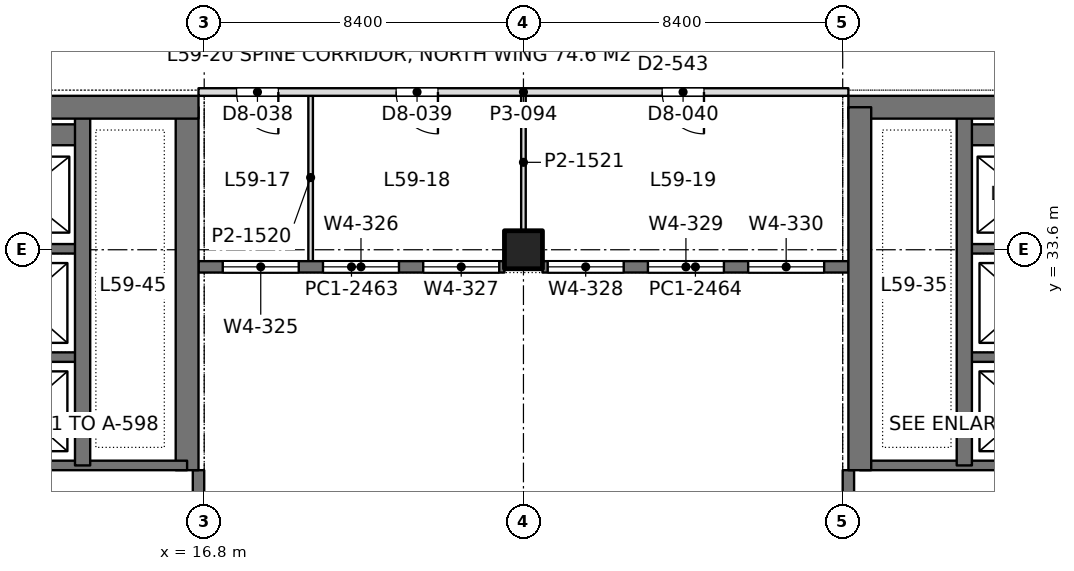
"""IFC4 building model, lengths in metres.
Left out: names, types, materials, properties, quantities, classifications, styles, units other than length and angle.
Written with IfcOpenShell. Run it as: python <this file> out.ifc"""

import sys

from ifc_helpers import new_model, si_unit, direction, frame, frame_2d, origin, origin_2d, place, context, subcontext, project, spatial, rectangle, extrude, element, fill, save


model = new_model("IFC4")
c1 = context("Model", 3, precision=1e-05, world=origin(), true_north=direction((0.0, 1.0)))
c2 = subcontext(c1, "Body", "Model", "MODEL_VIEW")
j1 = project(units=[si_unit("LENGTHUNIT", "METRE"), si_unit("PLANEANGLEUNIT", "RADIAN")], contexts=[c1])
p1 = place(None, origin())
s1 = spatial("IfcSite", under=j1, at=p1, CompositionType="ELEMENT")
p2 = place(p1, origin())
s2 = spatial("IfcBuilding", under=s1, at=p2, CompositionType="ELEMENT")
p3 = place(p2, frame((0.0, 0.0, 259.2)))
s3 = spatial("IfcBuildingStorey", under=s2, at=p3, CompositionType="ELEMENT", Elevation=259.2)
p4 = place(p3, frame((25.2, 33.6, 0.0), z_axis=(0.0, 0.0, 1.0), x_axis=(1.0, 0.0, 0.0)))
e1 = element("IfcColumn", 1, at=p4, inside=s3, PredefinedType="COLUMN", context=c2, shape_type="SweptSolid", body=[
    extrude(rectangle(XDim=1.0, YDim=1.0, at=origin_2d()), origin(), (0.0, 0.0, 1.0), 4.5),
])
p5 = place(p3, frame((-1.05, 37.35, 0.0), z_axis=(0.0, 0.0, 1.0), x_axis=(1.0, 0.0, 0.0)))
e2 = element("IfcWall", 2, at=p5, inside=s3, PredefinedType="SHEAR", context=c2, shape_type="SweptSolid", body=[
    extrude(rectangle(XDim=17.7, YDim=0.6, at=frame_2d((8.85, 0.0))), origin(), (0.0, 0.0, 1.0), 4.5),
])
p6 = place(p5, frame((8.8, 0.0, 0.0)))
e3 = element("IfcOpeningElement", 3, at=p6, cuts=e2, PredefinedType="OPENING", context=c2, shape_type="SweptSolid", body=[
    extrude(rectangle(XDim=1.8, YDim=2.4, at=frame_2d((0.9, 1.2))), frame((0.0, 0.31, 0.0), z_axis=(0.0, -1.0, 0.0), x_axis=(1.0, 0.0, 0.0)), (0.0, 0.0, 1.0), 0.62),
])
p7 = place(p3, frame((16.35, 27.8, 0.0), z_axis=(0.0, 0.0, 1.0), x_axis=(0.0, 1.0, 0.0)))
e4 = element("IfcWall", 4, at=p7, inside=s3, PredefinedType="SHEAR", context=c2, shape_type="SweptSolid", body=[
    extrude(rectangle(XDim=9.55, YDim=0.6, at=frame_2d((4.775, 0.0))), origin(), (0.0, 0.0, 1.0), 4.5),
])
p8 = place(p3, frame((13.6, 27.925, 0.0), z_axis=(0.0, 0.0, 1.0), x_axis=(0.0, 1.0, 0.0)))
e5 = element("IfcWall", 5, at=p8, inside=s3, PredefinedType="SHEAR", context=c2, shape_type="SweptSolid", body=[
    extrude(rectangle(XDim=9.425, YDim=0.4, at=frame_2d((4.712, 0.0))), origin(), (0.0, 0.0, 1.0), 4.5),
])
p9 = place(p3, frame((10.4, 27.925, 0.0), z_axis=(0.0, 0.0, 1.0), x_axis=(1.0, 0.0, 0.0)))
e6 = element("IfcWall", 6, at=p9, inside=s3, PredefinedType="SHEAR", context=c2, shape_type="SweptSolid", body=[
    extrude(rectangle(XDim=5.95, YDim=0.25, at=frame_2d((2.975, 0.0))), origin(), (0.0, 0.0, 1.0), 4.5),
])
for number, where, z_axis, x_axis in (
    (7, (10.4, 30.775, 0.0), (0.0, 0.0, 1.0), (1.0, 0.0, 0.0)),
    (8, (10.4, 33.625, 0.0), (0.0, 0.0, 1.0), (1.0, 0.0, 0.0)),
):
    element("IfcWall", number, at=place(p3, frame(where, z_axis=z_axis, x_axis=x_axis)), inside=s3, PredefinedType="SHEAR", context=c2, shape_type="SweptSolid", body=[
        extrude(rectangle(XDim=3.2, YDim=0.25, at=frame_2d((1.6, 0.0))), origin(), (0.0, 0.0, 1.0), 4.5),
    ])
p10 = place(p3, frame((10.4, 36.625, 0.0), z_axis=(0.0, 0.0, 1.0), x_axis=(1.0, 0.0, 0.0)))
e9 = element("IfcWall", 9, at=p10, inside=s3, PredefinedType="SHEAR", context=c2, shape_type="SweptSolid", body=[
    extrude(rectangle(XDim=3.2, YDim=0.55, at=frame_2d((1.6, 0.0))), origin(), (0.0, 0.0, 1.0), 4.5),
])
p11 = place(p3, frame((33.75, 37.35, 0.0), z_axis=(0.0, 0.0, 1.0), x_axis=(1.0, 0.0, 0.0)))
e10 = element("IfcWall", 10, at=p11, inside=s3, PredefinedType="SHEAR", context=c2, shape_type="SweptSolid", body=[
    extrude(rectangle(XDim=17.7, YDim=0.6, at=frame_2d((8.85, 0.0))), origin(), (0.0, 0.0, 1.0), 4.5),
])
p12 = place(p11, frame((7.1, 0.0, 0.0)))
e11 = element("IfcOpeningElement", 11, at=p12, cuts=e10, PredefinedType="OPENING", context=c2, shape_type="SweptSolid", body=[
    extrude(rectangle(XDim=1.8, YDim=2.4, at=frame_2d((0.9, 1.2))), frame((0.0, 0.31, 0.0), z_axis=(0.0, -1.0, 0.0), x_axis=(1.0, 0.0, 0.0)), (0.0, 0.0, 1.0), 0.62),
])
p13 = place(p3, frame((34.05, 27.8, 0.0), z_axis=(0.0, 0.0, 1.0), x_axis=(0.0, 1.0, 0.0)))
e12 = element("IfcWall", 12, at=p13, inside=s3, PredefinedType="SHEAR", context=c2, shape_type="SweptSolid", body=[
    extrude(rectangle(XDim=9.55, YDim=0.6, at=frame_2d((4.775, 0.0))), origin(), (0.0, 0.0, 1.0), 4.5),
])
p14 = place(p3, frame((36.8, 27.925, 0.0), z_axis=(0.0, 0.0, 1.0), x_axis=(0.0, 1.0, 0.0)))
e13 = element("IfcWall", 13, at=p14, inside=s3, PredefinedType="SHEAR", context=c2, shape_type="SweptSolid", body=[
    extrude(rectangle(XDim=9.425, YDim=0.4, at=frame_2d((4.712, 0.0))), origin(), (0.0, 0.0, 1.0), 4.5),
])
p15 = place(p3, frame((40.0, 27.925, 0.0), z_axis=(0.0, 0.0, 1.0), x_axis=(-1.0, 0.0, 0.0)))
e14 = element("IfcWall", 14, at=p15, inside=s3, PredefinedType="SHEAR", context=c2, shape_type="SweptSolid", body=[
    extrude(rectangle(XDim=5.95, YDim=0.25, at=frame_2d((2.975, 0.0))), origin(), (0.0, 0.0, 1.0), 4.5),
])
for number, where, z_axis, x_axis in (
    (15, (40.0, 30.775, 0.0), (0.0, 0.0, 1.0), (-1.0, 0.0, 0.0)),
    (16, (40.0, 33.625, 0.0), (0.0, 0.0, 1.0), (-1.0, 0.0, 0.0)),
):
    element("IfcWall", number, at=place(p3, frame(where, z_axis=z_axis, x_axis=x_axis)), inside=s3, PredefinedType="SHEAR", context=c2, shape_type="SweptSolid", body=[
        extrude(rectangle(XDim=3.2, YDim=0.25, at=frame_2d((1.6, 0.0))), origin(), (0.0, 0.0, 1.0), 4.5),
    ])
p16 = place(p3, frame((40.0, 36.625, 0.0), z_axis=(0.0, 0.0, 1.0), x_axis=(-1.0, 0.0, 0.0)))
e17 = element("IfcWall", 17, at=p16, inside=s3, PredefinedType="SHEAR", context=c2, shape_type="SweptSolid", body=[
    extrude(rectangle(XDim=3.2, YDim=0.55, at=frame_2d((1.6, 0.0))), origin(), (0.0, 0.0, 1.0), 4.5),
])
p17 = place(p3, frame((16.65, 17.1, 0.0), z_axis=(0.0, 0.0, 1.0), x_axis=(0.0, 1.0, 0.0)))
e18 = element("IfcWall", 18, at=p17, inside=s3, PredefinedType="SOLIDWALL", context=c2, shape_type="SweptSolid", body=[
    extrude(rectangle(XDim=10.7, YDim=0.3, at=frame_2d((5.35, 0.0))), origin(), (0.0, 0.0, 1.0), 4.35),
])
p18 = place(p17, frame((0.55, 0.0, 0.9)))
e19 = element("IfcOpeningElement", 19, at=p18, cuts=e18, PredefinedType="OPENING", context=c2, shape_type="SweptSolid", body=[
    extrude(rectangle(XDim=2.0, YDim=1.9, at=frame_2d((1.0, 0.95))), frame((0.0, 0.16, 0.0), z_axis=(0.0, -1.0, 0.0), x_axis=(1.0, 0.0, 0.0)), (0.0, 0.0, 1.0), 0.32),
])
p19 = place(p17, frame((2.9, 0.0, 0.9)))
e20 = element("IfcOpeningElement", 20, at=p19, cuts=e18, PredefinedType="OPENING", context=c2, shape_type="SweptSolid", body=[
    extrude(rectangle(XDim=2.0, YDim=1.9, at=frame_2d((1.0, 0.95))), frame((0.0, 0.16, 0.0), z_axis=(0.0, -1.0, 0.0), x_axis=(1.0, 0.0, 0.0)), (0.0, 0.0, 1.0), 0.32),
])
p20 = place(p17, frame((7.675, 0.0, 0.9)))
e21 = element("IfcOpeningElement", 21, at=p20, cuts=e18, PredefinedType="OPENING", context=c2, shape_type="SweptSolid", body=[
    extrude(rectangle(XDim=2.0, YDim=1.9, at=frame_2d((1.0, 0.95))), frame((0.0, 0.16, 0.0), z_axis=(0.0, -1.0, 0.0), x_axis=(1.0, 0.0, 0.0)), (0.0, 0.0, 1.0), 0.32),
])
p21 = place(p3, frame((33.75, 17.1, 0.0), z_axis=(0.0, 0.0, 1.0), x_axis=(0.0, 1.0, 0.0)))
e22 = element("IfcWall", 22, at=p21, inside=s3, PredefinedType="SOLIDWALL", context=c2, shape_type="SweptSolid", body=[
    extrude(rectangle(XDim=10.7, YDim=0.3, at=frame_2d((5.35, 0.0))), origin(), (0.0, 0.0, 1.0), 4.35),
])
p22 = place(p21, frame((0.55, 0.0, 0.9)))
e23 = element("IfcOpeningElement", 23, at=p22, cuts=e22, PredefinedType="OPENING", context=c2, shape_type="SweptSolid", body=[
    extrude(rectangle(XDim=2.0, YDim=1.9, at=frame_2d((1.0, 0.95))), frame((0.0, 0.16, 0.0), z_axis=(0.0, -1.0, 0.0), x_axis=(1.0, 0.0, 0.0)), (0.0, 0.0, 1.0), 0.32),
])
p23 = place(p21, frame((2.9, 0.0, 0.9)))
e24 = element("IfcOpeningElement", 24, at=p23, cuts=e22, PredefinedType="OPENING", context=c2, shape_type="SweptSolid", body=[
    extrude(rectangle(XDim=2.0, YDim=1.9, at=frame_2d((1.0, 0.95))), frame((0.0, 0.16, 0.0), z_axis=(0.0, -1.0, 0.0), x_axis=(1.0, 0.0, 0.0)), (0.0, 0.0, 1.0), 0.32),
])
p24 = place(p21, frame((7.675, 0.0, 0.9)))
e25 = element("IfcOpeningElement", 25, at=p24, cuts=e22, PredefinedType="OPENING", context=c2, shape_type="SweptSolid", body=[
    extrude(rectangle(XDim=2.0, YDim=1.9, at=frame_2d((1.0, 0.95))), frame((0.0, 0.16, 0.0), z_axis=(0.0, -1.0, 0.0), x_axis=(1.0, 0.0, 0.0)), (0.0, 0.0, 1.0), 0.32),
])
p25 = place(p3, frame((16.65, 33.15, 0.0), z_axis=(0.0, 0.0, 1.0), x_axis=(1.0, 0.0, 0.0)))
e26 = element("IfcWall", 26, at=p25, inside=s3, PredefinedType="SOLIDWALL", context=c2, shape_type="SweptSolid", body=[
    extrude(rectangle(XDim=8.05, YDim=0.3, at=frame_2d((4.025, 0.0))), origin(), (0.0, 0.0, 1.0), 4.35),
])
p26 = place(p25, frame((0.637, 0.0, 0.9)))
e27 = element("IfcOpeningElement", 27, at=p26, cuts=e26, PredefinedType="OPENING", context=c2, shape_type="SweptSolid", body=[
    extrude(rectangle(XDim=2.0, YDim=1.9, at=frame_2d((1.0, 0.95))), frame((0.0, 0.16, 0.0), z_axis=(0.0, -1.0, 0.0), x_axis=(1.0, 0.0, 0.0)), (0.0, 0.0, 1.0), 0.32),
])
p27 = place(p25, frame((3.275, 0.0, 0.9)))
e28 = element("IfcOpeningElement", 28, at=p27, cuts=e26, PredefinedType="OPENING", context=c2, shape_type="SweptSolid", body=[
    extrude(rectangle(XDim=2.0, YDim=1.9, at=frame_2d((1.0, 0.95))), frame((0.0, 0.16, 0.0), z_axis=(0.0, -1.0, 0.0), x_axis=(1.0, 0.0, 0.0)), (0.0, 0.0, 1.0), 0.32),
])
p28 = place(p25, frame((5.913, 0.0, 0.9)))
e29 = element("IfcOpeningElement", 29, at=p28, cuts=e26, PredefinedType="OPENING", context=c2, shape_type="SweptSolid", body=[
    extrude(rectangle(XDim=2.0, YDim=1.9, at=frame_2d((1.0, 0.95))), frame((0.0, 0.16, 0.0), z_axis=(0.0, -1.0, 0.0), x_axis=(1.0, 0.0, 0.0)), (0.0, 0.0, 1.0), 0.32),
])
p29 = place(p3, frame((25.7, 33.15, 0.0), z_axis=(0.0, 0.0, 1.0), x_axis=(1.0, 0.0, 0.0)))
e30 = element("IfcWall", 30, at=p29, inside=s3, PredefinedType="SOLIDWALL", context=c2, shape_type="SweptSolid", body=[
    extrude(rectangle(XDim=8.05, YDim=0.3, at=frame_2d((4.025, 0.0))), origin(), (0.0, 0.0, 1.0), 4.35),
])
p30 = place(p29, frame((0.137, 0.0, 0.9)))
e31 = element("IfcOpeningElement", 31, at=p30, cuts=e30, PredefinedType="OPENING", context=c2, shape_type="SweptSolid", body=[
    extrude(rectangle(XDim=2.0, YDim=1.9, at=frame_2d((1.0, 0.95))), frame((0.0, 0.16, 0.0), z_axis=(0.0, -1.0, 0.0), x_axis=(1.0, 0.0, 0.0)), (0.0, 0.0, 1.0), 0.32),
])
p31 = place(p29, frame((2.775, 0.0, 0.9)))
e32 = element("IfcOpeningElement", 32, at=p31, cuts=e30, PredefinedType="OPENING", context=c2, shape_type="SweptSolid", body=[
    extrude(rectangle(XDim=2.0, YDim=1.9, at=frame_2d((1.0, 0.95))), frame((0.0, 0.16, 0.0), z_axis=(0.0, -1.0, 0.0), x_axis=(1.0, 0.0, 0.0)), (0.0, 0.0, 1.0), 0.32),
])
p32 = place(p29, frame((5.413, 0.0, 0.9)))
e33 = element("IfcOpeningElement", 33, at=p32, cuts=e30, PredefinedType="OPENING", context=c2, shape_type="SweptSolid", body=[
    extrude(rectangle(XDim=2.0, YDim=1.9, at=frame_2d((1.0, 0.95))), frame((0.0, 0.16, 0.0), z_axis=(0.0, -1.0, 0.0), x_axis=(1.0, 0.0, 0.0)), (0.0, 0.0, 1.0), 0.32),
])
p33 = place(p3, frame((19.6, 33.298, 0.0), z_axis=(0.0, 0.0, 1.0), x_axis=(0.0, 1.0, 0.0)))
e34 = element("IfcWall", 34, at=p33, inside=s3, PredefinedType="PARTITIONING", context=c2, shape_type="SweptSolid", body=[
    extrude(rectangle(XDim=4.404, YDim=0.12, at=frame_2d((2.202, 0.0))), origin(), (0.0, 0.0, 1.0), 3.66),
])
p34 = place(p3, frame((25.2, 34.099, 0.0), z_axis=(0.0, 0.0, 1.0), x_axis=(0.0, 1.0, 0.0)))
e35 = element("IfcWall", 35, at=p34, inside=s3, PredefinedType="PARTITIONING", context=c2, shape_type="SweptSolid", body=[
    extrude(rectangle(XDim=3.603, YDim=0.12, at=frame_2d((1.801, 0.0))), origin(), (0.0, 0.0, 1.0), 3.8),
])
p35 = place(p3, frame((16.65, 37.75, 0.0), z_axis=(0.0, 0.0, 1.0), x_axis=(1.0, 0.0, 0.0)))
e36 = element("IfcWall", 36, at=p35, inside=s3, PredefinedType="PARTITIONING", context=c2, shape_type="SweptSolid", body=[
    extrude(rectangle(XDim=17.1, YDim=0.2, at=frame_2d((8.55, 0.0))), origin(), (0.0, 0.0, 1.0), 3.8),
])
p36 = place(p35, frame((1.001, 0.0, 0.0)))
e37 = element("IfcOpeningElement", 37, at=p36, cuts=e36, PredefinedType="OPENING", context=c2, shape_type="SweptSolid", body=[
    extrude(rectangle(XDim=1.1, YDim=2.4, at=frame_2d((0.55, 1.2))), frame((0.0, 0.11, 0.0), z_axis=(0.0, -1.0, 0.0), x_axis=(1.0, 0.0, 0.0)), (0.0, 0.0, 1.0), 0.22),
])
p37 = place(p35, frame((5.2, 0.0, 0.0)))
e38 = element("IfcOpeningElement", 38, at=p37, cuts=e36, PredefinedType="OPENING", context=c2, shape_type="SweptSolid", body=[
    extrude(rectangle(XDim=1.1, YDim=2.4, at=frame_2d((0.55, 1.2))), frame((0.0, 0.11, 0.0), z_axis=(0.0, -1.0, 0.0), x_axis=(1.0, 0.0, 0.0)), (0.0, 0.0, 1.0), 0.22),
])
p38 = place(p35, frame((12.2, 0.0, 0.0)))
e39 = element("IfcOpeningElement", 39, at=p38, cuts=e36, PredefinedType="OPENING", context=c2, shape_type="SweptSolid", body=[
    extrude(rectangle(XDim=1.1, YDim=2.4, at=frame_2d((0.55, 1.2))), frame((0.0, 0.11, 0.0), z_axis=(0.0, -1.0, 0.0), x_axis=(1.0, 0.0, 0.0)), (0.0, 0.0, 1.0), 0.22),
])
p39 = place(p26, origin())
e40 = element("IfcWindow", 40, at=p39, inside=s3, PartitioningType="SINGLE_PANEL", PredefinedType="WINDOW", context=c2, shape_type="SweptSolid", body=[
    extrude(rectangle(XDim=2.0, YDim=1.9, at=frame_2d((1.0, 0.95))), frame((0.0, 0.03, 0.0), z_axis=(0.0, -1.0, 0.0), x_axis=(1.0, 0.0, 0.0)), (0.0, 0.0, 1.0), 0.06),
])
fill(e27, e40)
p40 = place(p27, origin())
e41 = element("IfcWindow", 41, at=p40, inside=s3, PartitioningType="SINGLE_PANEL", PredefinedType="WINDOW", context=c2, shape_type="SweptSolid", body=[
    extrude(rectangle(XDim=2.0, YDim=1.9, at=frame_2d((1.0, 0.95))), frame((0.0, 0.03, 0.0), z_axis=(0.0, -1.0, 0.0), x_axis=(1.0, 0.0, 0.0)), (0.0, 0.0, 1.0), 0.06),
])
fill(e28, e41)
p41 = place(p28, origin())
e42 = element("IfcWindow", 42, at=p41, inside=s3, PartitioningType="SINGLE_PANEL", PredefinedType="WINDOW", context=c2, shape_type="SweptSolid", body=[
    extrude(rectangle(XDim=2.0, YDim=1.9, at=frame_2d((1.0, 0.95))), frame((0.0, 0.03, 0.0), z_axis=(0.0, -1.0, 0.0), x_axis=(1.0, 0.0, 0.0)), (0.0, 0.0, 1.0), 0.06),
])
fill(e29, e42)
p42 = place(p30, origin())
e43 = element("IfcWindow", 43, at=p42, inside=s3, PartitioningType="SINGLE_PANEL", PredefinedType="WINDOW", context=c2, shape_type="SweptSolid", body=[
    extrude(rectangle(XDim=2.0, YDim=1.9, at=frame_2d((1.0, 0.95))), frame((0.0, 0.03, 0.0), z_axis=(0.0, -1.0, 0.0), x_axis=(1.0, 0.0, 0.0)), (0.0, 0.0, 1.0), 0.06),
])
fill(e31, e43)
p43 = place(p31, origin())
e44 = element("IfcWindow", 44, at=p43, inside=s3, PartitioningType="SINGLE_PANEL", PredefinedType="WINDOW", context=c2, shape_type="SweptSolid", body=[
    extrude(rectangle(XDim=2.0, YDim=1.9, at=frame_2d((1.0, 0.95))), frame((0.0, 0.03, 0.0), z_axis=(0.0, -1.0, 0.0), x_axis=(1.0, 0.0, 0.0)), (0.0, 0.0, 1.0), 0.06),
])
fill(e32, e44)
p44 = place(p32, origin())
e45 = element("IfcWindow", 45, at=p44, inside=s3, PartitioningType="SINGLE_PANEL", PredefinedType="WINDOW", context=c2, shape_type="SweptSolid", body=[
    extrude(rectangle(XDim=2.0, YDim=1.9, at=frame_2d((1.0, 0.95))), frame((0.0, 0.03, 0.0), z_axis=(0.0, -1.0, 0.0), x_axis=(1.0, 0.0, 0.0)), (0.0, 0.0, 1.0), 0.06),
])
fill(e33, e45)
p45 = place(p36, frame((1.1, 0.0, 0.0), z_axis=(0.0, 0.0, 1.0), x_axis=(-1.0, 0.0, 0.0)))
e46 = element("IfcDoor", 46, at=p45, inside=s3, OperationType="SINGLE_SWING_LEFT", PredefinedType="DOOR", context=c2, shape_type="SweptSolid", body=[
    extrude(rectangle(XDim=1.1, YDim=2.4, at=frame_2d((0.55, 1.2))), frame((0.0, 0.025, 0.0), z_axis=(0.0, -1.0, 0.0), x_axis=(1.0, 0.0, 0.0)), (0.0, 0.0, 1.0), 0.05),
])
fill(e37, e46)
p46 = place(p37, frame((1.1, 0.0, 0.0), z_axis=(0.0, 0.0, 1.0), x_axis=(-1.0, 0.0, 0.0)))
e47 = element("IfcDoor", 47, at=p46, inside=s3, OperationType="SINGLE_SWING_LEFT", PredefinedType="DOOR", context=c2, shape_type="SweptSolid", body=[
    extrude(rectangle(XDim=1.1, YDim=2.4, at=frame_2d((0.55, 1.2))), frame((0.0, 0.025, 0.0), z_axis=(0.0, -1.0, 0.0), x_axis=(1.0, 0.0, 0.0)), (0.0, 0.0, 1.0), 0.05),
])
fill(e38, e47)
p47 = place(p38, frame((1.1, 0.0, 0.0), z_axis=(0.0, 0.0, 1.0), x_axis=(-1.0, 0.0, 0.0)))
e48 = element("IfcDoor", 48, at=p47, inside=s3, OperationType="SINGLE_SWING_LEFT", PredefinedType="DOOR", context=c2, shape_type="SweptSolid", body=[
    extrude(rectangle(XDim=1.1, YDim=2.4, at=frame_2d((0.55, 1.2))), frame((0.0, 0.025, 0.0), z_axis=(0.0, -1.0, 0.0), x_axis=(1.0, 0.0, 0.0)), (0.0, 0.0, 1.0), 0.05),
])
fill(e39, e48)
save(model, sys.argv[1])
